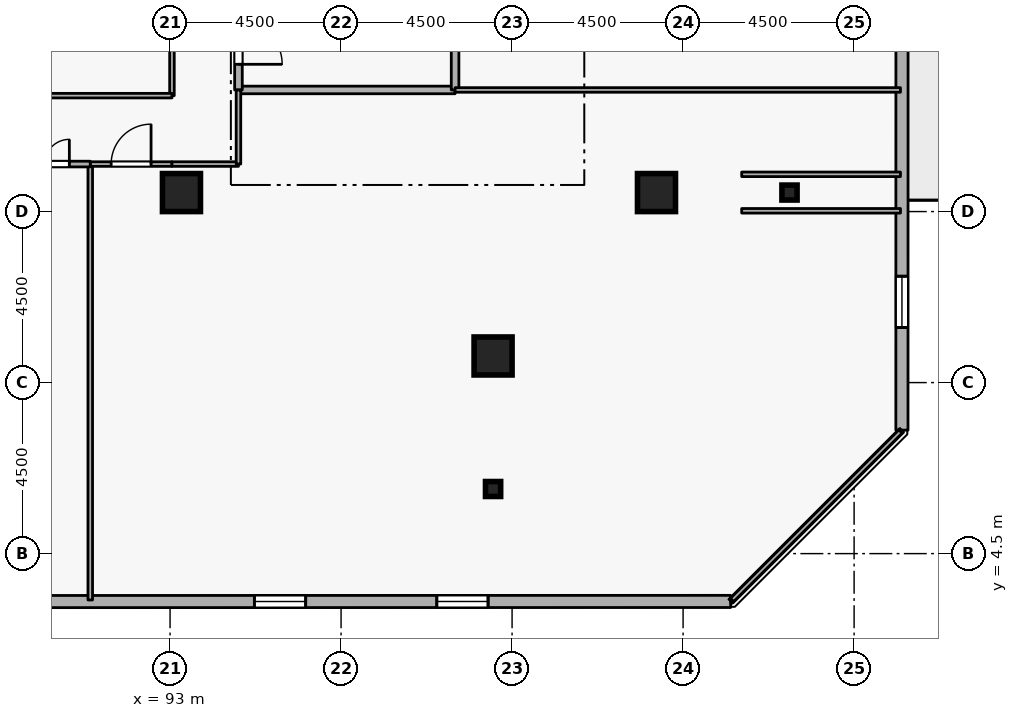
"""IFC4 building model, lengths in metres.
Left out: names, types, materials, properties, quantities, classifications, styles, units other than length and angle.
Written with IfcOpenShell. Run it as: python <this file> out.ifc"""

import sys

from ifc_helpers import new_model, si_unit, direction, frame, frame_2d, origin, origin_2d, place, context, subcontext, project, spatial, rectangle, i_section, extrude, element, fill, save


model = new_model("IFC4")
c1 = context("Model", 3, precision=1e-05, world=origin(), true_north=direction((0.0, 1.0)))
c2 = subcontext(c1, "Body", "Model", "MODEL_VIEW")
j1 = project(units=[si_unit("LENGTHUNIT", "METRE"), si_unit("PLANEANGLEUNIT", "RADIAN")], contexts=[c1])
p1 = place(None, origin())
s1 = spatial("IfcSite", under=j1, at=p1, CompositionType="ELEMENT")
p2 = place(p1, origin())
s2 = spatial("IfcBuilding", under=s1, at=p2, CompositionType="ELEMENT")
p3 = place(p2, frame((0.0, 0.0, 251.1)))
s3 = spatial("IfcBuildingStorey", under=s2, at=p3, CompositionType="ELEMENT", Elevation=251.1)
for number, where, z_axis, x_axis in (
    (1, (105.8, 14.0, 0.0), (0.0, 0.0, 1.0), (1.0, 0.0, 0.0)),
    (2, (101.5, 9.7, 0.0), (0.0, 0.0, 1.0), (1.0, 0.0, 0.0)),
    (3, (93.3, 14.0, 0.0), (0.0, 0.0, 1.0), (1.0, 0.0, 0.0)),
):
    element("IfcColumn", number, at=place(p3, frame(where, z_axis=z_axis, x_axis=x_axis)), inside=s3, PredefinedType="COLUMN", context=c2, shape_type="SweptSolid", body=[
        extrude(rectangle(XDim=1.0, YDim=1.0, at=origin_2d()), origin(), (0.0, 0.0, 1.0), 3.6),
    ])
for number, where, z_axis, x_axis in (
    (4, (109.3, 14.0, 0.0), (0.0, 0.0, 1.0), (1.0, 0.0, 0.0)),
    (5, (101.5, 6.2, 0.0), (0.0, 0.0, 1.0), (1.0, 0.0, 0.0)),
):
    element("IfcColumn", number, at=place(p3, frame(where, z_axis=z_axis, x_axis=x_axis)), inside=s3, PredefinedType="COLUMN", context=c2, shape_type="SweptSolid", body=[
        extrude(i_section(OverallWidth=0.399, OverallDepth=0.394, WebThickness=0.023, FlangeThickness=0.037, FilletRadius=0.015, at=origin_2d()), origin(), (0.0, 0.0, 1.0), 3.6),
    ])
p4 = place(p3, frame((73.319, 3.235, 0.0), z_axis=(0.0, 0.0, 1.0), x_axis=(0.999999983007, 0.000184351399, 0.0)))
e6 = element("IfcWall", 6, at=p4, inside=s3, PredefinedType="STANDARD", context=c2, shape_type="SweptSolid", body=[
    extrude(rectangle(XDim=34.432, YDim=0.32, at=frame_2d((17.216, 0.0))), origin(), (0.0, 0.0, 1.0), 2.22),
])
p5 = place(p4, frame((2.7, 0.0, 0.72)))
e7 = element("IfcOpeningElement", 7, at=p5, cuts=e6, PredefinedType="OPENING", context=c2, shape_type="SweptSolid", body=[
    extrude(rectangle(XDim=1.35, YDim=1.05, at=frame_2d((0.675, 0.525))), frame((0.0, 0.17, 0.0), z_axis=(0.0, -1.0, 0.0), x_axis=(1.0, 0.0, 0.0)), (0.0, 0.0, 1.0), 0.34),
])
p6 = place(p4, frame((7.5, 0.0, 0.72)))
e8 = element("IfcOpeningElement", 8, at=p6, cuts=e6, PredefinedType="OPENING", context=c2, shape_type="SweptSolid", body=[
    extrude(rectangle(XDim=1.35, YDim=1.05, at=frame_2d((0.675, 0.525))), frame((0.0, 0.17, 0.0), z_axis=(0.0, -1.0, 0.0), x_axis=(1.0, 0.0, 0.0)), (0.0, 0.0, 1.0), 0.34),
])
p7 = place(p4, frame((21.9, 0.0, 0.72)))
e9 = element("IfcOpeningElement", 9, at=p7, cuts=e6, PredefinedType="OPENING", context=c2, shape_type="SweptSolid", body=[
    extrude(rectangle(XDim=1.35, YDim=1.05, at=frame_2d((0.675, 0.525))), frame((0.0, 0.17, 0.0), z_axis=(0.0, -1.0, 0.0), x_axis=(1.0, 0.0, 0.0)), (0.0, 0.0, 1.0), 0.34),
])
p8 = place(p4, frame((26.7, 0.0, 0.72)))
e10 = element("IfcOpeningElement", 10, at=p8, cuts=e6, PredefinedType="OPENING", context=c2, shape_type="SweptSolid", body=[
    extrude(rectangle(XDim=1.35, YDim=1.05, at=frame_2d((0.675, 0.525))), frame((0.0, 0.17, 0.0), z_axis=(0.0, -1.0, 0.0), x_axis=(1.0, 0.0, 0.0)), (0.0, 0.0, 1.0), 0.34),
])
p9 = place(p3, frame((112.258, 7.749, 0.0), z_axis=(0.0, 0.0, 1.0), x_axis=(0.000184351399, 0.999999983007, 0.0)))
e11 = element("IfcWall", 11, at=p9, inside=s3, PredefinedType="STANDARD", context=c2, shape_type="SweptSolid", body=[
    extrude(rectangle(XDim=34.432, YDim=0.32, at=frame_2d((17.216, 0.0))), origin(), (0.0, 0.0, 1.0), 2.22),
])
p10 = place(p9, frame((27.566, 0.0, 0.0)))
e12 = element("IfcOpeningElement", 12, at=p10, cuts=e11, PredefinedType="OPENING", context=c2, shape_type="SweptSolid", body=[
    extrude(rectangle(XDim=1.0, YDim=2.08, at=frame_2d((0.5, 1.04))), frame((0.0, 0.17, 0.0), z_axis=(0.0, -1.0, 0.0), x_axis=(1.0, 0.0, 0.0)), (0.0, 0.0, 1.0), 0.34),
])
p11 = place(p9, frame((2.7, 0.0, 0.72)))
e13 = element("IfcOpeningElement", 13, at=p11, cuts=e11, PredefinedType="OPENING", context=c2, shape_type="SweptSolid", body=[
    extrude(rectangle(XDim=1.35, YDim=1.05, at=frame_2d((0.675, 0.525))), frame((0.0, 0.17, 0.0), z_axis=(0.0, -1.0, 0.0), x_axis=(1.0, 0.0, 0.0)), (0.0, 0.0, 1.0), 0.34),
])
p12 = place(p9, frame((12.3, 0.0, 0.72)))
e14 = element("IfcOpeningElement", 14, at=p12, cuts=e11, PredefinedType="OPENING", context=c2, shape_type="SweptSolid", body=[
    extrude(rectangle(XDim=1.35, YDim=1.05, at=frame_2d((0.675, 0.525))), frame((0.0, 0.17, 0.0), z_axis=(0.0, -1.0, 0.0), x_axis=(1.0, 0.0, 0.0)), (0.0, 0.0, 1.0), 0.34),
])
p13 = place(p9, frame((17.1, 0.0, 0.72)))
e15 = element("IfcOpeningElement", 15, at=p13, cuts=e11, PredefinedType="OPENING", context=c2, shape_type="SweptSolid", body=[
    extrude(rectangle(XDim=1.35, YDim=1.05, at=frame_2d((0.675, 0.525))), frame((0.0, 0.17, 0.0), z_axis=(0.0, -1.0, 0.0), x_axis=(1.0, 0.0, 0.0)), (0.0, 0.0, 1.0), 0.34),
])
p14 = place(p9, frame((21.9, 0.0, 0.72)))
e16 = element("IfcOpeningElement", 16, at=p14, cuts=e11, PredefinedType="OPENING", context=c2, shape_type="SweptSolid", body=[
    extrude(rectangle(XDim=1.35, YDim=1.05, at=frame_2d((0.675, 0.525))), frame((0.0, 0.17, 0.0), z_axis=(0.0, -1.0, 0.0), x_axis=(1.0, 0.0, 0.0)), (0.0, 0.0, 1.0), 0.34),
])
p15 = place(p3, frame((94.8, 16.7, 0.0), z_axis=(0.0, 0.0, 1.0), x_axis=(1.0, 0.0, 0.0)))
e17 = element("IfcWall", 17, at=p15, inside=s3, PredefinedType="STANDARD", context=c2, shape_type="SweptSolid", body=[
    extrude(rectangle(XDim=5.7, YDim=0.2, at=frame_2d((2.85, 0.0))), origin(), (0.0, 0.0, 1.0), 3.32),
])
p16 = place(p3, frame((100.5, 16.7, 0.0), z_axis=(0.0, 0.0, 1.0), x_axis=(0.0, 1.0, 0.0)))
e18 = element("IfcWall", 18, at=p16, inside=s3, PredefinedType="STANDARD", context=c2, shape_type="SweptSolid", body=[
    extrude(rectangle(XDim=2.5, YDim=0.2, at=frame_2d((1.25, 0.0))), origin(), (0.0, 0.0, 1.0), 3.32),
])
p17 = place(p3, frame((94.8, 19.2, 0.0), z_axis=(0.0, 0.0, 1.0), x_axis=(0.0, -1.0, 0.0)))
e19 = element("IfcWall", 19, at=p17, inside=s3, PredefinedType="STANDARD", context=c2, shape_type="SweptSolid", body=[
    extrude(rectangle(XDim=2.5, YDim=0.2, at=frame_2d((1.25, 0.0))), origin(), (0.0, 0.0, 1.0), 3.32),
])
p18 = place(p17, frame((0.675, 0.0, 0.0)))
e20 = element("IfcOpeningElement", 20, at=p18, cuts=e19, PredefinedType="OPENING", context=c2, shape_type="SweptSolid", body=[
    extrude(rectangle(XDim=1.15, YDim=2.1, at=frame_2d((0.575, 1.05))), frame((0.0, 0.11, 0.0), z_axis=(0.0, -1.0, 0.0), x_axis=(1.0, 0.0, 0.0)), (0.0, 0.0, 1.0), 0.22),
])
p19 = place(p3, frame((90.9, 3.28, 0.0), z_axis=(0.0, 0.0, 1.0), x_axis=(0.0, 1.0, 0.0)))
e21 = element("IfcWall", 21, at=p19, inside=s3, PredefinedType="PARTITIONING", context=c2, shape_type="SweptSolid", body=[
    extrude(rectangle(XDim=11.47, YDim=0.12, at=frame_2d((5.735, 0.0))), origin(), (0.0, 0.0, 1.0), 3.32),
])
p20 = place(p3, frame((90.9, 14.75, 0.0), z_axis=(0.0, 0.0, 1.0), x_axis=(1.0, 0.0, 0.0)))
e22 = element("IfcWall", 22, at=p20, inside=s3, PredefinedType="PARTITIONING", context=c2, shape_type="SweptSolid", body=[
    extrude(rectangle(XDim=2.15, YDim=0.12, at=frame_2d((1.075, 0.0))), origin(), (0.0, 0.0, 1.0), 3.32),
])
p21 = place(p20, frame((0.55, 0.0, 0.0)))
e23 = element("IfcOpeningElement", 23, at=p21, cuts=e22, PredefinedType="OPENING", context=c2, shape_type="SweptSolid", body=[
    extrude(rectangle(XDim=1.05, YDim=2.1, at=frame_2d((0.525, 1.05))), frame((0.0, 0.07, 0.0), z_axis=(0.0, -1.0, 0.0), x_axis=(1.0, 0.0, 0.0)), (0.0, 0.0, 1.0), 0.14),
])
p22 = place(p3, frame((93.05, 14.75, 0.0), z_axis=(0.0, 0.0, 1.0), x_axis=(1.0, 0.0, 0.0)))
e24 = element("IfcWall", 24, at=p22, inside=s3, PredefinedType="PARTITIONING", context=c2, shape_type="SweptSolid", body=[
    extrude(rectangle(XDim=1.75, YDim=0.12, at=frame_2d((0.875, 0.0))), origin(), (0.0, 0.0, 1.0), 3.32),
])
p23 = place(p3, frame((94.8, 14.75, 0.0), z_axis=(0.0, 0.0, 1.0), x_axis=(0.0, 1.0, 0.0)))
e25 = element("IfcWall", 25, at=p23, inside=s3, PredefinedType="PARTITIONING", context=c2, shape_type="SweptSolid", body=[
    extrude(rectangle(XDim=1.95, YDim=0.12, at=frame_2d((0.975, 0.0))), origin(), (0.0, 0.0, 1.0), 3.32),
])
p24 = place(p3, frame((100.5, 16.7, 0.0), z_axis=(0.0, 0.0, 1.0), x_axis=(1.0, 0.0, 0.0)))
e26 = element("IfcWall", 26, at=p24, inside=s3, PredefinedType="PARTITIONING", context=c2, shape_type="SweptSolid", body=[
    extrude(rectangle(XDim=11.72, YDim=0.12, at=frame_2d((5.86, 0.0))), origin(), (0.0, 0.0, 1.0), 3.32),
])
for number, where, z_axis, x_axis in (
    (27, (112.22, 14.48, 0.0), (0.0, 0.0, 1.0), (-1.0, 0.0, 0.0)),
    (28, (108.042, 13.52, 0.0), (0.0, 0.0, 1.0), (1.0, 0.0, 0.0)),
):
    element("IfcWall", number, at=place(p3, frame(where, z_axis=z_axis, x_axis=x_axis)), inside=s3, PredefinedType="PARTITIONING", context=c2, shape_type="SweptSolid", body=[
        extrude(rectangle(XDim=4.178, YDim=0.12, at=frame_2d((2.089, 0.0))), origin(), (0.0, 0.0, 1.0), 1.785),
    ])
p25 = place(p3, frame((112.22, 7.713, 0.0), z_axis=(0.0, 0.0, 1.0), x_axis=(-0.707106781187, -0.707106781187, 0.0)))
e29 = element("IfcWall", 29, at=p25, inside=s3, PredefinedType="PARTITIONING", context=c2, shape_type="SweptSolid", body=[
    extrude(rectangle(XDim=6.269, YDim=0.12, at=frame_2d((3.134, 0.0))), origin(), (0.0, 0.0, 1.0), 3.32),
])
p26 = place(p3, frame((88.5, 14.75, 0.0), z_axis=(0.0, 0.0, 1.0), x_axis=(1.0, 0.0, 0.0)))
e30 = element("IfcWall", 30, at=p26, inside=s3, PredefinedType="PARTITIONING", context=c2, shape_type="SweptSolid", body=[
    extrude(rectangle(XDim=2.4, YDim=0.15, at=frame_2d((1.2, 0.0))), origin(), (0.0, 0.0, 1.0), 3.32),
])
p27 = place(p26, frame((0.55, 0.0, 0.0)))
e31 = element("IfcOpeningElement", 31, at=p27, cuts=e30, PredefinedType="OPENING", context=c2, shape_type="SweptSolid", body=[
    extrude(rectangle(XDim=1.3, YDim=2.12, at=frame_2d((0.65, 1.06))), frame((0.0, 0.085, 0.0), z_axis=(0.0, -1.0, 0.0), x_axis=(1.0, 0.0, 0.0)), (0.0, 0.0, 1.0), 0.17),
])
p28 = place(p3, frame((93.05, 22.4, 0.0), z_axis=(0.0, 0.0, 1.0), x_axis=(0.0, -1.0, 0.0)))
e32 = element("IfcWall", 32, at=p28, inside=s3, PredefinedType="PARTITIONING", context=c2, shape_type="SweptSolid", body=[
    extrude(rectangle(XDim=5.85, YDim=0.12, at=frame_2d((2.925, 0.0))), origin(), (0.0, 0.0, 1.0), 3.32),
])
p29 = place(p28, frame((2.45, 0.0, 0.0)))
e33 = element("IfcOpeningElement", 33, at=p29, cuts=e32, PredefinedType="OPENING", context=c2, shape_type="SweptSolid", body=[
    extrude(rectangle(XDim=0.95, YDim=2.1, at=frame_2d((0.475, 1.05))), frame((0.0, 0.07, 0.0), z_axis=(0.0, -1.0, 0.0), x_axis=(1.0, 0.0, 0.0)), (0.0, 0.0, 1.0), 0.14),
])
p30 = place(p3, frame((93.05, 16.55, 0.0), z_axis=(0.0, 0.0, 1.0), x_axis=(-1.0, 0.0, 0.0)))
e34 = element("IfcWall", 34, at=p30, inside=s3, PredefinedType="PARTITIONING", context=c2, shape_type="SweptSolid", body=[
    extrude(rectangle(XDim=3.75, YDim=0.12, at=frame_2d((1.875, 0.0))), origin(), (0.0, 0.0, 1.0), 3.32),
])
p31 = place(p7, origin())
e35 = element("IfcWindow", 35, at=p31, inside=s3, PartitioningType="SINGLE_PANEL", PredefinedType="WINDOW", context=c2, shape_type="SweptSolid", body=[
    extrude(rectangle(XDim=1.35, YDim=1.05, at=frame_2d((0.675, 0.525))), frame((0.0, 0.03, 0.0), z_axis=(0.0, -1.0, 0.0), x_axis=(1.0, 0.0, 0.0)), (0.0, 0.0, 1.0), 0.06),
])
fill(e9, e35)
p32 = place(p8, origin())
e36 = element("IfcWindow", 36, at=p32, inside=s3, PartitioningType="SINGLE_PANEL", PredefinedType="WINDOW", context=c2, shape_type="SweptSolid", body=[
    extrude(rectangle(XDim=1.35, YDim=1.05, at=frame_2d((0.675, 0.525))), frame((0.0, 0.03, 0.0), z_axis=(0.0, -1.0, 0.0), x_axis=(1.0, 0.0, 0.0)), (0.0, 0.0, 1.0), 0.06),
])
fill(e10, e36)
p33 = place(p11, origin())
e37 = element("IfcWindow", 37, at=p33, inside=s3, PartitioningType="SINGLE_PANEL", PredefinedType="WINDOW", context=c2, shape_type="SweptSolid", body=[
    extrude(rectangle(XDim=1.35, YDim=1.05, at=frame_2d((0.675, 0.525))), frame((0.0, 0.03, 0.0), z_axis=(0.0, -1.0, 0.0), x_axis=(1.0, 0.0, 0.0)), (0.0, 0.0, 1.0), 0.06),
])
fill(e13, e37)
p34 = place(p18, origin())
e38 = element("IfcDoor", 38, at=p34, inside=s3, OperationType="SINGLE_SWING_RIGHT", PredefinedType="DOOR", context=c2, shape_type="SweptSolid", body=[
    extrude(rectangle(XDim=1.15, YDim=2.1, at=frame_2d((0.575, 1.05))), frame((0.0, 0.025, 0.0), z_axis=(0.0, -1.0, 0.0), x_axis=(1.0, 0.0, 0.0)), (0.0, 0.0, 1.0), 0.05),
])
fill(e20, e38)
p35 = place(p21, origin())
e39 = element("IfcDoor", 39, at=p35, inside=s3, OperationType="SINGLE_SWING_RIGHT", PredefinedType="DOOR", context=c2, shape_type="SweptSolid", body=[
    extrude(rectangle(XDim=1.05, YDim=2.1, at=frame_2d((0.525, 1.05))), frame((0.0, 0.025, 0.0), z_axis=(0.0, -1.0, 0.0), x_axis=(1.0, 0.0, 0.0)), (0.0, 0.0, 1.0), 0.05),
])
fill(e23, e39)
p36 = place(p27, origin())
e40 = element("IfcDoor", 40, at=p36, inside=s3, OperationType="DOUBLE_DOOR_SINGLE_SWING", PredefinedType="DOOR", context=c2, shape_type="SweptSolid", body=[
    extrude(rectangle(XDim=1.3, YDim=2.12, at=frame_2d((0.65, 1.06))), frame((0.0, 0.025, 0.0), z_axis=(0.0, -1.0, 0.0), x_axis=(1.0, 0.0, 0.0)), (0.0, 0.0, 1.0), 0.05),
])
fill(e31, e40)
save(model, sys.argv[1])
